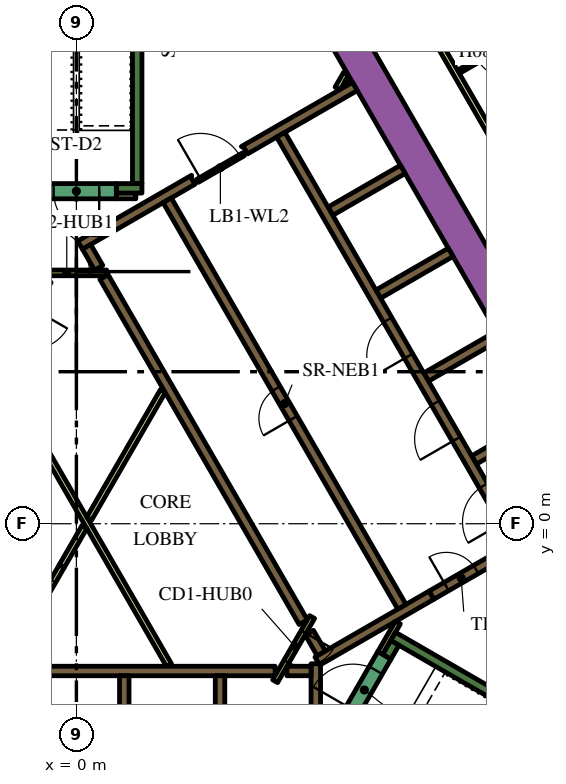
"""IFC4 building model, lengths in metres.
Left out: names, types, materials, properties, quantities, classifications, styles, units other than length and angle.
Written with IfcOpenShell. Run it as: python <this file> out.ifc"""

import sys

from ifc_helpers import new_model, si_unit, direction, frame, frame_2d, origin, place, context, subcontext, project, spatial, polyline, rectangle, outline, extrude, element, fill, save


model = new_model("IFC4")
c1 = context("Model", 3, precision=1e-05, world=origin(), true_north=direction((0.0, 1.0)))
c2 = subcontext(c1, "Body", "Model", "MODEL_VIEW")
j1 = project(units=[si_unit("LENGTHUNIT", "METRE"), si_unit("PLANEANGLEUNIT", "RADIAN")], contexts=[c1])
p1 = place(None, origin())
s1 = spatial("IfcSite", under=j1, at=p1, CompositionType="ELEMENT")
p2 = place(p1, origin())
s2 = spatial("IfcBuilding", under=s1, at=p2, CompositionType="ELEMENT")
p3 = place(p2, frame((0.0, 0.0, 114.9)))
s3 = spatial("IfcBuildingStorey", under=s2, at=p3, CompositionType="ELEMENT", Elevation=114.9)
p4 = place(p3, frame((6.776, 13.364, 0.0), z_axis=(0.0, 0.0, 1.0), x_axis=(0.500004177138, -0.8660229921, 0.0)))
e1 = element("IfcWall", 1, at=p4, inside=s3, PredefinedType="SOLIDWALL", context=c2, shape_type="SweptSolid", body=[
    extrude(rectangle(XDim=20.204, YDim=0.9, at=frame_2d((10.102, 0.0))), origin(), (0.0, 0.0, 1.0), 3.9),
])
p5 = place(p3, frame((8.334, -2.964, 0.0), z_axis=(0.0, 0.0, 1.0), x_axis=(0.866016039709, -0.500016218704, 0.0)))
e2 = element("IfcWall", 2, at=p5, inside=s3, PredefinedType="SOLIDWALL", context=c2, shape_type="SweptSolid", body=[
    extrude(rectangle(XDim=7.05, YDim=0.25, at=frame_2d((3.525, 0.0))), origin(), (0.0, 0.0, 1.0), 3.9),
])
p6 = place(p3, frame((8.168, -3.503, 0.0), z_axis=(0.0, 0.0, 1.0), x_axis=(0.49972245349, 0.866185586049, 0.0)))
e3 = element("IfcWall", 3, at=p6, inside=s3, PredefinedType="SOLIDWALL", context=c2, shape_type="SweptSolid", body=[
    extrude(rectangle(XDim=0.425, YDim=0.25, at=frame_2d((0.212, 0.0))), origin(), (0.0, 0.0, 1.0), 3.9),
])
p7 = place(p3, frame((1.6, 8.95, 0.0), z_axis=(0.0, 0.0, 1.0), x_axis=(0.0, 1.0, 0.0)))
e4 = element("IfcWall", 4, at=p7, inside=s3, PredefinedType="SOLIDWALL", context=c2, shape_type="SweptSolid", body=[
    extrude(rectangle(XDim=6.8, YDim=0.25, at=frame_2d((3.4, 0.0))), origin(), (0.0, 0.0, 1.0), 3.9),
])
p8 = place(p3, frame((1.05, 8.825, 0.0), z_axis=(0.0, 0.0, 1.0), x_axis=(1.0, 0.0, 0.0)))
e5 = element("IfcWall", 5, at=p8, inside=s3, PredefinedType="SOLIDWALL", context=c2, shape_type="SweptSolid", body=[
    extrude(rectangle(XDim=0.675, YDim=0.25, at=frame_2d((0.337, 0.0))), origin(), (0.0, 0.0, 1.0), 3.9),
])
p9 = place(p3, frame((-5.259, -3.875, 0.0), z_axis=(0.0, 0.0, 1.0), x_axis=(1.0, 0.0, 0.0)))
e6 = element("IfcWall", 6, at=p9, inside=s3, PredefinedType="SOLIDWALL", context=c2, shape_type="SweptSolid", body=[
    extrude(rectangle(XDim=10.489, YDim=0.25, at=frame_2d((5.244, 0.0))), origin(), (0.0, 0.0, 1.0), 3.9),
])
for number, where, z_axis, x_axis in (
    (7, (3.78, -4.0, 0.0), (0.0, 0.0, 1.0), (0.0, -1.0, 0.0)),
    (8, (1.26, -4.0, 0.0), (0.0, 0.0, 1.0), (0.0, -1.0, 0.0)),
):
    element("IfcWall", number, at=place(p3, frame(where, z_axis=z_axis, x_axis=x_axis)), inside=s3, PredefinedType="SOLIDWALL", context=c2, shape_type="SweptSolid", body=[
        extrude(rectangle(XDim=2.2, YDim=0.25, at=frame_2d((1.1, 0.0))), origin(), (0.0, 0.0, 1.0), 3.9),
    ])
p10 = place(p3, frame((6.3, -7.27, 0.0), z_axis=(0.0, 0.0, 1.0), x_axis=(0.0, 1.0, 0.0)))
e9 = element("IfcWall", 9, at=p10, inside=s3, PredefinedType="SOLIDWALL", context=c2, shape_type="SweptSolid", body=[
    extrude(rectangle(XDim=3.586, YDim=0.25, at=frame_2d((1.793, 0.0))), origin(), (0.0, 0.0, 1.0), 3.9),
])
p11 = place(p3, frame((5.538, -3.875, 0.0), z_axis=(0.0, 0.0, 1.0), x_axis=(1.0, 0.0, 0.0)))
e10 = element("IfcWall", 10, at=p11, inside=s3, PredefinedType="SOLIDWALL", context=c2, shape_type="SweptSolid", body=[
    extrude(rectangle(XDim=0.637, YDim=0.25, at=frame_2d((0.318, 0.0))), origin(), (0.0, 0.0, 1.0), 3.9),
])
p12 = place(p3, frame((10.464, 1.677, 0.0), z_axis=(0.0, 0.0, 1.0), x_axis=(0.86605622881, 0.499946605688, 0.0)))
e11 = element("IfcWall", 11, at=p12, inside=s3, PredefinedType="SOLIDWALL", context=c2, shape_type="SweptSolid", body=[
    extrude(rectangle(XDim=2.2, YDim=0.25, at=frame_2d((1.1, 0.0))), origin(), (0.0, 0.0, 1.0), 3.9),
])
p13 = place(p3, frame((9.346, -1.879, 0.0), z_axis=(0.0, 0.0, 1.0), x_axis=(-0.866048528039, -0.499959945477, 0.0)))
e12 = element("IfcWall", 12, at=p13, inside=s3, PredefinedType="SOLIDWALL", context=c2, shape_type="SweptSolid", body=[
    extrude(rectangle(XDim=3.47, YDim=0.25, at=frame_2d((1.735, 0.0))), origin(), (0.0, 0.0, 1.0), 3.9),
])
p14 = place(p3, frame((6.13, -2.867, 0.0), z_axis=(0.0, 0.0, 1.0), x_axis=(0.500160776593, -0.865932559475, 0.0)))
e13 = element("IfcWall", 13, at=p14, inside=s3, PredefinedType="SOLIDWALL", context=c2, shape_type="SweptSolid", body=[
    extrude(rectangle(XDim=0.627, YDim=0.25, at=frame_2d((0.313, 0.0))), origin(), (0.0, 0.0, 1.0), 3.9),
])
for number, where, z_axis, x_axis in (
    (14, (9.204, 3.859, 0.0), (0.0, 0.0, 1.0), (0.866, 0.5, 0.0)),
    (15, (7.944, 6.041, 0.0), (0.0, 0.0, 1.0), (0.866, 0.5, 0.0)),
    (16, (6.684, 8.224, 0.0), (0.0, 0.0, 1.0), (0.866, 0.5, 0.0)),
):
    element("IfcWall", number, at=place(p3, frame(where, z_axis=z_axis, x_axis=x_axis)), inside=s3, PredefinedType="SOLIDWALL", context=c2, shape_type="SweptSolid", body=[
        extrude(rectangle(XDim=2.2, YDim=0.25, at=frame_2d((1.1, 0.0))), origin(), (0.0, 0.0, 1.0), 3.9),
    ])
p15 = place(p3, origin())
e17 = element("IfcWall", 17, at=p15, inside=s3, PredefinedType="SOLIDWALL", context=c2, shape_type="SweptSolid", body=[
    extrude(outline(polyline([(2.776, 8.733), (2.499, 8.573), (2.498, 8.573), (2.498, 8.573), (2.282, 8.448), (2.282, 8.448), (0.377, 7.348), (0.16, 7.223), (0.035, 7.439), (3.032, 9.169), (3.03, 9.152), (3.03, 9.133), (3.031, 9.113), (3.035, 9.094), (3.04, 9.075), (3.047, 9.057), (3.056, 9.039), (3.119, 8.931), (2.776, 8.733)])), origin(), (0.0, 0.0, 1.0), 3.9),
])
e18 = element("IfcWall", 18, at=p15, inside=s3, PredefinedType="SOLIDWALL", context=c2, shape_type="SweptSolid", body=[
    extrude(outline(polyline([(5.27, 10.173), (5.27, 10.173), (4.683, 9.834), (4.504, 9.731), (4.442, 9.839), (4.431, 9.856), (4.419, 9.871), (4.406, 9.885), (4.39, 9.898), (4.374, 9.909), (4.357, 9.918), (4.341, 9.925), (7.266, 11.614), (7.391, 11.398), (5.486, 10.298), (5.486, 10.298), (5.27, 10.173), (5.27, 10.173)])), origin(), (0.0, 0.0, 1.0), 3.9),
])
p16 = place(p3, frame((0.268, 7.285, 0.0), z_axis=(0.0, 0.0, 1.0), x_axis=(0.500098681536, -0.865968422476, 0.0)))
e19 = element("IfcWall", 19, at=p16, inside=s3, PredefinedType="SOLIDWALL", context=c2, shape_type="SweptSolid", body=[
    extrude(rectangle(XDim=0.636, YDim=0.25, at=frame_2d((0.318, 0.0))), origin(), (0.0, 0.0, 1.0), 3.9),
])
p17 = place(p3, frame((5.97, -2.591, 0.0), z_axis=(0.0, 0.0, 1.0), x_axis=(-0.499994469932, 0.866028596547, 0.0)))
e20 = element("IfcWall", 20, at=p17, inside=s3, PredefinedType="SOLIDWALL", context=c2, shape_type="SweptSolid", body=[
    extrude(rectangle(XDim=10.488, YDim=0.25, at=frame_2d((5.244, 0.0))), origin(), (0.0, 0.0, 1.0), 3.9),
])
p18 = place(p3, frame((8.459, -2.599, 0.0), z_axis=(0.0, 0.0, 1.0), x_axis=(-0.500041054325, -0.866001699761, 0.0)))
e21 = element("IfcWall", 21, at=p18, inside=s3, PredefinedType="PARTITIONING", context=c2, shape_type="SweptSolid", body=[
    extrude(rectangle(XDim=0.929, YDim=0.15, at=frame_2d((0.464, 0.0))), origin(), (0.0, 0.0, 1.0), 3.9),
])
p19 = place(p3, frame((2.435, -3.718, 0.0), z_axis=(0.0, 0.0, 1.0), x_axis=(-0.499985176046, 0.866033962229, 0.0)))
e22 = element("IfcWall", 22, at=p19, inside=s3, PredefinedType="PARTITIONING", context=c2, shape_type="SweptSolid", body=[
    extrude(rectangle(XDim=8.875, YDim=0.15, at=frame_2d((4.438, 0.0))), origin(), (0.0, 0.0, 1.0), 2.75),
])
p20 = place(p3, frame((0.336, 0.132, 0.0), z_axis=(0.0, 0.0, 1.0), x_axis=(0.500001957507, 0.866024273614, 0.0)))
e23 = element("IfcWall", 23, at=p20, inside=s3, PredefinedType="PARTITIONING", context=c2, shape_type="SweptSolid", body=[
    extrude(rectangle(XDim=3.881, YDim=0.15, at=frame_2d((1.941, 0.0))), origin(), (0.0, 0.0, 1.0), 2.75),
])
p21 = place(p3, frame((-0.387, -1.121, 0.0), z_axis=(0.0, 0.0, 1.0), x_axis=(0.500057179532, 0.865992388649, 0.0)))
e24 = element("IfcWall", 24, at=p21, inside=s3, PredefinedType="PARTITIONING", context=c2, shape_type="SweptSolid", body=[
    extrude(rectangle(XDim=1.199, YDim=0.15, at=frame_2d((0.6, 0.0))), origin(), (0.0, 0.0, 1.0), 2.75),
])
p22 = place(p3, frame((1.05, 8.625, 0.0), z_axis=(0.0, 0.0, 1.0), x_axis=(1.0, 0.0, 0.0)))
e25 = element("IfcWall", 25, at=p22, inside=s3, PredefinedType="PARTITIONING", context=c2, shape_type="SweptSolid", body=[
    extrude(rectangle(XDim=0.514, YDim=0.15, at=frame_2d((0.257, 0.0))), origin(), (0.0, 0.0, 1.0), 2.75),
])
p23 = place(p3, frame((6.872, 11.45, 0.0), z_axis=(0.0, 0.0, 1.0), x_axis=(0.499846793097, 0.866113839764, 0.0)))
e26 = element("IfcWall", 26, at=p23, inside=s3, PredefinedType="PARTITIONING", context=c2, shape_type="SweptSolid", body=[
    extrude(rectangle(XDim=0.453, YDim=0.15, at=frame_2d((0.227, 0.0))), origin(), (0.0, 0.0, 1.0), 2.75),
])
p24 = place(p3, frame((7.131, 11.6, 0.0), z_axis=(0.0, 0.0, 1.0), x_axis=(0.498600033135, 0.866832167699, 0.0)))
e27 = element("IfcWall", 27, at=p24, inside=s3, PredefinedType="PARTITIONING", context=c2, shape_type="SweptSolid", body=[
    extrude(rectangle(XDim=0.107, YDim=0.15, at=frame_2d((0.053, 0.0))), origin(), (0.0, 0.0, 1.0), 2.75),
])
p25 = place(p3, frame((11.553, -0.46, 0.0), z_axis=(0.0, 0.0, 1.0), x_axis=(-0.500006514828, 0.866021642414, 0.0)))
e28 = element("IfcWall", 28, at=p25, inside=s3, PredefinedType="SOLIDWALL", context=c2, shape_type="SweptSolid", body=[
    extrude(rectangle(XDim=12.35, YDim=0.25, at=frame_2d((6.175, 0.0))), origin(), (0.0, 0.0, 1.0), 3.9),
])
p26 = place(p25, frame((0.585, 0.0, 0.0)))
e29 = element("IfcOpeningElement", 29, at=p26, cuts=e28, PredefinedType="OPENING", context=c2, shape_type="SweptSolid", body=[
    extrude(rectangle(XDim=1.1, YDim=2.1, at=frame_2d((0.55, 1.05))), frame((0.0, 0.135, 0.0), z_axis=(0.0, -1.0, 0.0), x_axis=(1.0, 0.0, 0.0)), (0.0, 0.0, 1.0), 0.27),
])
p27 = place(p25, frame((3.105, 0.0, 0.0)))
e30 = element("IfcOpeningElement", 30, at=p27, cuts=e28, PredefinedType="OPENING", context=c2, shape_type="SweptSolid", body=[
    extrude(rectangle(XDim=1.1, YDim=2.1, at=frame_2d((0.55, 1.05))), frame((0.0, 0.135, 0.0), z_axis=(0.0, -1.0, 0.0), x_axis=(1.0, 0.0, 0.0)), (0.0, 0.0, 1.0), 0.27),
])
p28 = place(p25, frame((5.625, 0.0, 0.0)))
e31 = element("IfcOpeningElement", 31, at=p28, cuts=e28, PredefinedType="OPENING", context=c2, shape_type="SweptSolid", body=[
    extrude(rectangle(XDim=1.1, YDim=2.1, at=frame_2d((0.55, 1.05))), frame((0.0, 0.135, 0.0), z_axis=(0.0, -1.0, 0.0), x_axis=(1.0, 0.0, 0.0)), (0.0, 0.0, 1.0), 0.27),
])
p29 = place(p3, frame((8.565, -2.185, 0.0), z_axis=(0.0, 0.0, 1.0), x_axis=(-0.499997954832, 0.866026584559, 0.0)))
e32 = element("IfcWall", 32, at=p29, inside=s3, PredefinedType="SOLIDWALL", context=c2, shape_type="SweptSolid", body=[
    extrude(rectangle(XDim=12.35, YDim=0.25, at=frame_2d((6.175, 0.0))), origin(), (0.0, 0.0, 1.0), 3.9),
])
p30 = place(p29, frame((5.725, 0.0, 0.0)))
e33 = element("IfcOpeningElement", 33, at=p30, cuts=e32, PredefinedType="OPENING", context=c2, shape_type="SweptSolid", body=[
    extrude(rectangle(XDim=0.9, YDim=2.1, at=frame_2d((0.45, 1.05))), frame((0.0, 0.135, 0.0), z_axis=(0.0, -1.0, 0.0), x_axis=(1.0, 0.0, 0.0)), (0.0, 0.0, 1.0), 0.27),
])
p31 = place(p3, frame((7.053, -5.284, 0.0), z_axis=(0.0, 0.0, 1.0), x_axis=(0.500078061341, 0.865980330357, 0.0)))
e34 = element("IfcWall", 34, at=p31, inside=s3, PredefinedType="SOLIDWALL", context=c2, shape_type="SweptSolid", body=[
    extrude(rectangle(XDim=2.1, YDim=0.4, at=frame_2d((1.05, 0.0))), origin(), (0.0, 0.0, 1.0), 3.9),
])
p32 = place(p31, frame((0.45, 0.0, 0.0)))
e35 = element("IfcOpeningElement", 35, at=p32, cuts=e34, PredefinedType="OPENING", context=c2, shape_type="SweptSolid", body=[
    extrude(rectangle(XDim=1.2, YDim=2.1, at=frame_2d((0.6, 1.05))), frame((0.0, 0.21, 0.0), z_axis=(0.0, -1.0, 0.0), x_axis=(1.0, 0.0, 0.0)), (0.0, 0.0, 1.0), 0.42),
])
p33 = place(p3, frame((9.346, -1.879, 0.0), z_axis=(0.0, 0.0, 1.0), x_axis=(0.866047807691, 0.499961193289, 0.0)))
e36 = element("IfcWall", 36, at=p33, inside=s3, PredefinedType="SOLIDWALL", context=c2, shape_type="SweptSolid", body=[
    extrude(rectangle(XDim=1.8, YDim=0.25, at=frame_2d((0.9, 0.0))), origin(), (0.0, 0.0, 1.0), 3.9),
])
p34 = place(p33, frame((0.45, 0.0, 0.0)))
e37 = element("IfcOpeningElement", 37, at=p34, cuts=e36, PredefinedType="OPENING", context=c2, shape_type="SweptSolid", body=[
    extrude(rectangle(XDim=0.9, YDim=2.1, at=frame_2d((0.45, 1.05))), frame((0.0, 0.135, 0.0), z_axis=(0.0, -1.0, 0.0), x_axis=(1.0, 0.0, 0.0)), (0.0, 0.0, 1.0), 0.27),
])
p35 = place(p3, frame((1.05, 8.75, 0.0), z_axis=(0.0, 0.0, 1.0), x_axis=(-1.0, 0.0, 0.0)))
e38 = element("IfcWall", 38, at=p35, inside=s3, PredefinedType="SOLIDWALL", context=c2, shape_type="SweptSolid", body=[
    extrude(rectangle(XDim=2.1, YDim=0.4, at=frame_2d((1.05, 0.0))), origin(), (0.0, 0.0, 1.0), 3.9),
])
p36 = place(p35, frame((0.45, 0.0, 0.0)))
e39 = element("IfcOpeningElement", 39, at=p36, cuts=e38, PredefinedType="OPENING", context=c2, shape_type="SweptSolid", body=[
    extrude(rectangle(XDim=1.2, YDim=2.1, at=frame_2d((0.6, 1.05))), frame((0.0, 0.21, 0.0), z_axis=(0.0, -1.0, 0.0), x_axis=(1.0, 0.0, 0.0)), (0.0, 0.0, 1.0), 0.42),
])
p37 = place(p3, frame((6.203, -2.456, 0.0), z_axis=(0.0, 0.0, 1.0), x_axis=(-0.500043961785, -0.866000020948, 0.0)))
e40 = element("IfcWall", 40, at=p37, inside=s3, PredefinedType="PARTITIONING", context=c2, shape_type="SweptSolid", body=[
    extrude(rectangle(XDim=1.95, YDim=0.15, at=frame_2d((0.975, 0.0))), origin(), (0.0, 0.0, 1.0), 3.9),
])
p38 = place(p37, frame((0.45, 0.0, 0.0)))
e41 = element("IfcOpeningElement", 41, at=p38, cuts=e40, PredefinedType="OPENING", context=c2, shape_type="SweptSolid", body=[
    extrude(rectangle(XDim=0.9, YDim=2.1, at=frame_2d((0.45, 1.05))), frame((0.0, 0.085, 0.0), z_axis=(0.0, -1.0, 0.0), x_axis=(1.0, 0.0, 0.0)), (0.0, 0.0, 1.0), 0.17),
])
p39 = place(p3, frame((-1.303, 6.6, 0.0), z_axis=(0.0, 0.0, 1.0), x_axis=(1.0, 0.0, 0.0)))
e42 = element("IfcWall", 42, at=p39, inside=s3, PredefinedType="PARTITIONING", context=c2, shape_type="SweptSolid", body=[
    extrude(rectangle(XDim=2.1, YDim=0.15, at=frame_2d((1.05, 0.0))), origin(), (0.0, 0.0, 1.0), 3.9),
])
p40 = place(p39, frame((0.45, 0.0, 0.0)))
e43 = element("IfcOpeningElement", 43, at=p40, cuts=e42, PredefinedType="OPENING", context=c2, shape_type="SweptSolid", body=[
    extrude(rectangle(XDim=1.2, YDim=2.1, at=frame_2d((0.6, 1.05))), frame((0.0, 0.085, 0.0), z_axis=(0.0, -1.0, 0.0), x_axis=(1.0, 0.0, 0.0)), (0.0, 0.0, 1.0), 0.17),
])
p41 = place(p3, frame((3.183, 9.02, 0.0), z_axis=(0.0, 0.0, 1.0), x_axis=(0.866034573852, 0.49998411664, 0.0)))
e44 = element("IfcWall", 44, at=p41, inside=s3, PredefinedType="PARTITIONING", context=c2, shape_type="SweptSolid", body=[
    extrude(rectangle(XDim=1.4, YDim=0.09, at=frame_2d((0.7, 0.0))), origin(), (0.0, 0.0, 1.0), 2.75),
])
p42 = place(p41, frame((0.1, 0.0, 0.0)))
e45 = element("IfcOpeningElement", 45, at=p42, cuts=e44, PredefinedType="OPENING", context=c2, shape_type="SweptSolid", body=[
    extrude(rectangle(XDim=1.2, YDim=2.1, at=frame_2d((0.6, 1.05))), frame((0.0, 0.055, 0.0), z_axis=(0.0, -1.0, 0.0), x_axis=(1.0, 0.0, 0.0)), (0.0, 0.0, 1.0), 0.11),
])
p43 = place(p3, frame((-1.287, -2.679, 0.0), z_axis=(0.0, 0.0, 1.0), x_axis=(0.499961193289, 0.866047807691, 0.0)))
e46 = element("IfcWall", 46, at=p43, inside=s3, PredefinedType="PARTITIONING", context=c2, shape_type="SweptSolid", body=[
    extrude(rectangle(XDim=1.8, YDim=0.15, at=frame_2d((0.9, 0.0))), origin(), (0.0, 0.0, 1.0), 2.75),
])
p44 = place(p43, frame((0.45, 0.0, 0.0)))
e47 = element("IfcOpeningElement", 47, at=p44, cuts=e46, PredefinedType="OPENING", context=c2, shape_type="SweptSolid", body=[
    extrude(rectangle(XDim=0.9, YDim=2.1, at=frame_2d((0.45, 1.05))), frame((0.0, 0.085, 0.0), z_axis=(0.0, -1.0, 0.0), x_axis=(1.0, 0.0, 0.0)), (0.0, 0.0, 1.0), 0.17),
])
p45 = place(p3, frame((6.163, 18.475, 0.0), z_axis=(0.0, 0.0, 1.0), x_axis=(0.500001317485, -0.866024643133, 0.0)))
e48 = element("IfcWall", 48, at=p45, inside=s3, PredefinedType="PARTITIONING", context=c2, shape_type="SweptSolid", body=[
    extrude(rectangle(XDim=25.767, YDim=0.15, at=frame_2d((12.883, 0.0))), origin(), (0.0, 0.0, 1.0), 2.75),
])
p46 = place(p45, frame((24.241, 0.0, 0.0)))
e49 = element("IfcOpeningElement", 49, at=p46, cuts=e48, PredefinedType="OPENING", context=c2, shape_type="SweptSolid", body=[
    extrude(rectangle(XDim=1.0, YDim=2.1, at=frame_2d((0.5, 1.05))), frame((0.0, 0.085, 0.0), z_axis=(0.0, -1.0, 0.0), x_axis=(1.0, 0.0, 0.0)), (0.0, 0.0, 1.0), 0.17),
])
p47 = place(p45, frame((13.144, 0.0, 0.0)))
e50 = element("IfcOpeningElement", 50, at=p47, cuts=e48, PredefinedType="OPENING", context=c2, shape_type="SweptSolid", body=[
    extrude(rectangle(XDim=1.0, YDim=2.1, at=frame_2d((0.5, 1.05))), frame((0.0, 0.085, 0.0), z_axis=(0.0, -1.0, 0.0), x_axis=(1.0, 0.0, 0.0)), (0.0, 0.0, 1.0), 0.17),
])
p48 = place(p45, frame((10.874, 0.0, 0.0)))
e51 = element("IfcOpeningElement", 51, at=p48, cuts=e48, PredefinedType="OPENING", context=c2, shape_type="SweptSolid", body=[
    extrude(rectangle(XDim=0.9, YDim=2.1, at=frame_2d((0.45, 1.05))), frame((0.0, 0.085, 0.0), z_axis=(0.0, -1.0, 0.0), x_axis=(1.0, 0.0, 0.0)), (0.0, 0.0, 1.0), 0.17),
])
p49 = place(p45, frame((3.718, 0.0, 0.0)))
e52 = element("IfcOpeningElement", 52, at=p49, cuts=e48, PredefinedType="OPENING", context=c2, shape_type="SweptSolid", body=[
    extrude(rectangle(XDim=1.0, YDim=2.1, at=frame_2d((0.5, 1.05))), frame((0.0, 0.085, 0.0), z_axis=(0.0, -1.0, 0.0), x_axis=(1.0, 0.0, 0.0)), (0.0, 0.0, 1.0), 0.17),
])
p50 = place(p45, frame((2.411, 0.0, 0.0)))
e53 = element("IfcOpeningElement", 53, at=p50, cuts=e48, PredefinedType="OPENING", context=c2, shape_type="SweptSolid", body=[
    extrude(rectangle(XDim=1.0, YDim=2.1, at=frame_2d((0.5, 1.05))), frame((0.0, 0.085, 0.0), z_axis=(0.0, -1.0, 0.0), x_axis=(1.0, 0.0, 0.0)), (0.0, 0.0, 1.0), 0.17),
])
p51 = place(p3, frame((12.39, 13.239, 0.0), z_axis=(0.0, 0.0, 1.0), x_axis=(-0.866036505625, -0.499980770555, 0.0)))
e54 = element("IfcWall", 54, at=p51, inside=s3, PredefinedType="PARTITIONING", context=c2, shape_type="SweptSolid", body=[
    extrude(rectangle(XDim=2.7, YDim=0.1, at=frame_2d((1.35, 0.0))), origin(), (0.0, 0.0, 1.0), 2.75),
])
p52 = place(p51, frame((1.2, 0.0, 0.0)))
e55 = element("IfcOpeningElement", 55, at=p52, cuts=e54, PredefinedType="OPENING", context=c2, shape_type="SweptSolid", body=[
    extrude(rectangle(XDim=0.9, YDim=2.1, at=frame_2d((0.45, 1.05))), frame((0.0, 0.06, 0.0), z_axis=(0.0, -1.0, 0.0), x_axis=(1.0, 0.0, 0.0)), (0.0, 0.0, 1.0), 0.12),
])
p53 = place(p26, origin())
e56 = element("IfcDoor", 56, at=p53, inside=s3, OperationType="DOUBLE_DOOR_SLIDING", PredefinedType="DOOR", context=c2, shape_type="SweptSolid", body=[
    extrude(rectangle(XDim=1.1, YDim=2.1, at=frame_2d((0.55, 1.05))), frame((0.0, 0.025, 0.0), z_axis=(0.0, -1.0, 0.0), x_axis=(1.0, 0.0, 0.0)), (0.0, 0.0, 1.0), 0.05),
])
fill(e29, e56)
p54 = place(p27, origin())
e57 = element("IfcDoor", 57, at=p54, inside=s3, OperationType="DOUBLE_DOOR_SLIDING", PredefinedType="DOOR", context=c2, shape_type="SweptSolid", body=[
    extrude(rectangle(XDim=1.1, YDim=2.1, at=frame_2d((0.55, 1.05))), frame((0.0, 0.025, 0.0), z_axis=(0.0, -1.0, 0.0), x_axis=(1.0, 0.0, 0.0)), (0.0, 0.0, 1.0), 0.05),
])
fill(e30, e57)
p55 = place(p28, origin())
e58 = element("IfcDoor", 58, at=p55, inside=s3, OperationType="DOUBLE_DOOR_SLIDING", PredefinedType="DOOR", context=c2, shape_type="SweptSolid", body=[
    extrude(rectangle(XDim=1.1, YDim=2.1, at=frame_2d((0.55, 1.05))), frame((0.0, 0.025, 0.0), z_axis=(0.0, -1.0, 0.0), x_axis=(1.0, 0.0, 0.0)), (0.0, 0.0, 1.0), 0.05),
])
fill(e31, e58)
p56 = place(p30, origin())
e59 = element("IfcDoor", 59, at=p56, inside=s3, OperationType="SINGLE_SWING_LEFT", PredefinedType="DOOR", context=c2, shape_type="SweptSolid", body=[
    extrude(rectangle(XDim=0.9, YDim=2.1, at=frame_2d((0.45, 1.05))), frame((0.0, 0.025, 0.0), z_axis=(0.0, -1.0, 0.0), x_axis=(1.0, 0.0, 0.0)), (0.0, 0.0, 1.0), 0.05),
])
fill(e33, e59)
p57 = place(p32, origin())
e60 = element("IfcDoor", 60, at=p57, inside=s3, OperationType="SINGLE_SWING_LEFT", PredefinedType="DOOR", context=c2, shape_type="SweptSolid", body=[
    extrude(rectangle(XDim=1.2, YDim=2.1, at=frame_2d((0.6, 1.05))), frame((0.0, 0.025, 0.0), z_axis=(0.0, -1.0, 0.0), x_axis=(1.0, 0.0, 0.0)), (0.0, 0.0, 1.0), 0.05),
])
fill(e35, e60)
p58 = place(p34, origin())
e61 = element("IfcDoor", 61, at=p58, inside=s3, OperationType="SINGLE_SWING_LEFT", PredefinedType="DOOR", context=c2, shape_type="SweptSolid", body=[
    extrude(rectangle(XDim=0.9, YDim=2.1, at=frame_2d((0.45, 1.05))), frame((0.0, 0.025, 0.0), z_axis=(0.0, -1.0, 0.0), x_axis=(1.0, 0.0, 0.0)), (0.0, 0.0, 1.0), 0.05),
])
fill(e37, e61)
p59 = place(p36, origin())
e62 = element("IfcDoor", 62, at=p59, inside=s3, OperationType="SINGLE_SWING_LEFT", PredefinedType="DOOR", context=c2, shape_type="SweptSolid", body=[
    extrude(rectangle(XDim=1.2, YDim=2.1, at=frame_2d((0.6, 1.05))), frame((0.0, 0.025, 0.0), z_axis=(0.0, -1.0, 0.0), x_axis=(1.0, 0.0, 0.0)), (0.0, 0.0, 1.0), 0.05),
])
fill(e39, e62)
p60 = place(p38, origin())
e63 = element("IfcDoor", 63, at=p60, inside=s3, OperationType="SINGLE_SWING_LEFT", PredefinedType="DOOR", context=c2, shape_type="SweptSolid", body=[
    extrude(rectangle(XDim=0.9, YDim=2.1, at=frame_2d((0.45, 1.05))), frame((0.0, 0.025, 0.0), z_axis=(0.0, -1.0, 0.0), x_axis=(1.0, 0.0, 0.0)), (0.0, 0.0, 1.0), 0.05),
])
fill(e41, e63)
p61 = place(p40, origin())
e64 = element("IfcDoor", 64, at=p61, inside=s3, OperationType="SINGLE_SWING_LEFT", PredefinedType="DOOR", context=c2, shape_type="SweptSolid", body=[
    extrude(rectangle(XDim=1.2, YDim=2.1, at=frame_2d((0.6, 1.05))), frame((0.0, 0.025, 0.0), z_axis=(0.0, -1.0, 0.0), x_axis=(1.0, 0.0, 0.0)), (0.0, 0.0, 1.0), 0.05),
])
fill(e43, e64)
p62 = place(p42, origin())
e65 = element("IfcDoor", 65, at=p62, inside=s3, OperationType="SINGLE_SWING_LEFT", PredefinedType="DOOR", context=c2, shape_type="SweptSolid", body=[
    extrude(rectangle(XDim=1.2, YDim=2.1, at=frame_2d((0.6, 1.05))), frame((0.0, 0.025, 0.0), z_axis=(0.0, -1.0, 0.0), x_axis=(1.0, 0.0, 0.0)), (0.0, 0.0, 1.0), 0.05),
])
fill(e45, e65)
p63 = place(p44, origin())
e66 = element("IfcDoor", 66, at=p63, inside=s3, OperationType="SINGLE_SWING_LEFT", PredefinedType="DOOR", context=c2, shape_type="SweptSolid", body=[
    extrude(rectangle(XDim=0.9, YDim=2.1, at=frame_2d((0.45, 1.05))), frame((0.0, 0.025, 0.0), z_axis=(0.0, -1.0, 0.0), x_axis=(1.0, 0.0, 0.0)), (0.0, 0.0, 1.0), 0.05),
])
fill(e47, e66)
p64 = place(p52, origin())
e67 = element("IfcDoor", 67, at=p64, inside=s3, OperationType="SINGLE_SWING_LEFT", PredefinedType="DOOR", context=c2, shape_type="SweptSolid", body=[
    extrude(rectangle(XDim=0.9, YDim=2.1, at=frame_2d((0.45, 1.05))), frame((0.0, 0.025, 0.0), z_axis=(0.0, -1.0, 0.0), x_axis=(1.0, 0.0, 0.0)), (0.0, 0.0, 1.0), 0.05),
])
fill(e55, e67)
save(model, sys.argv[1])
